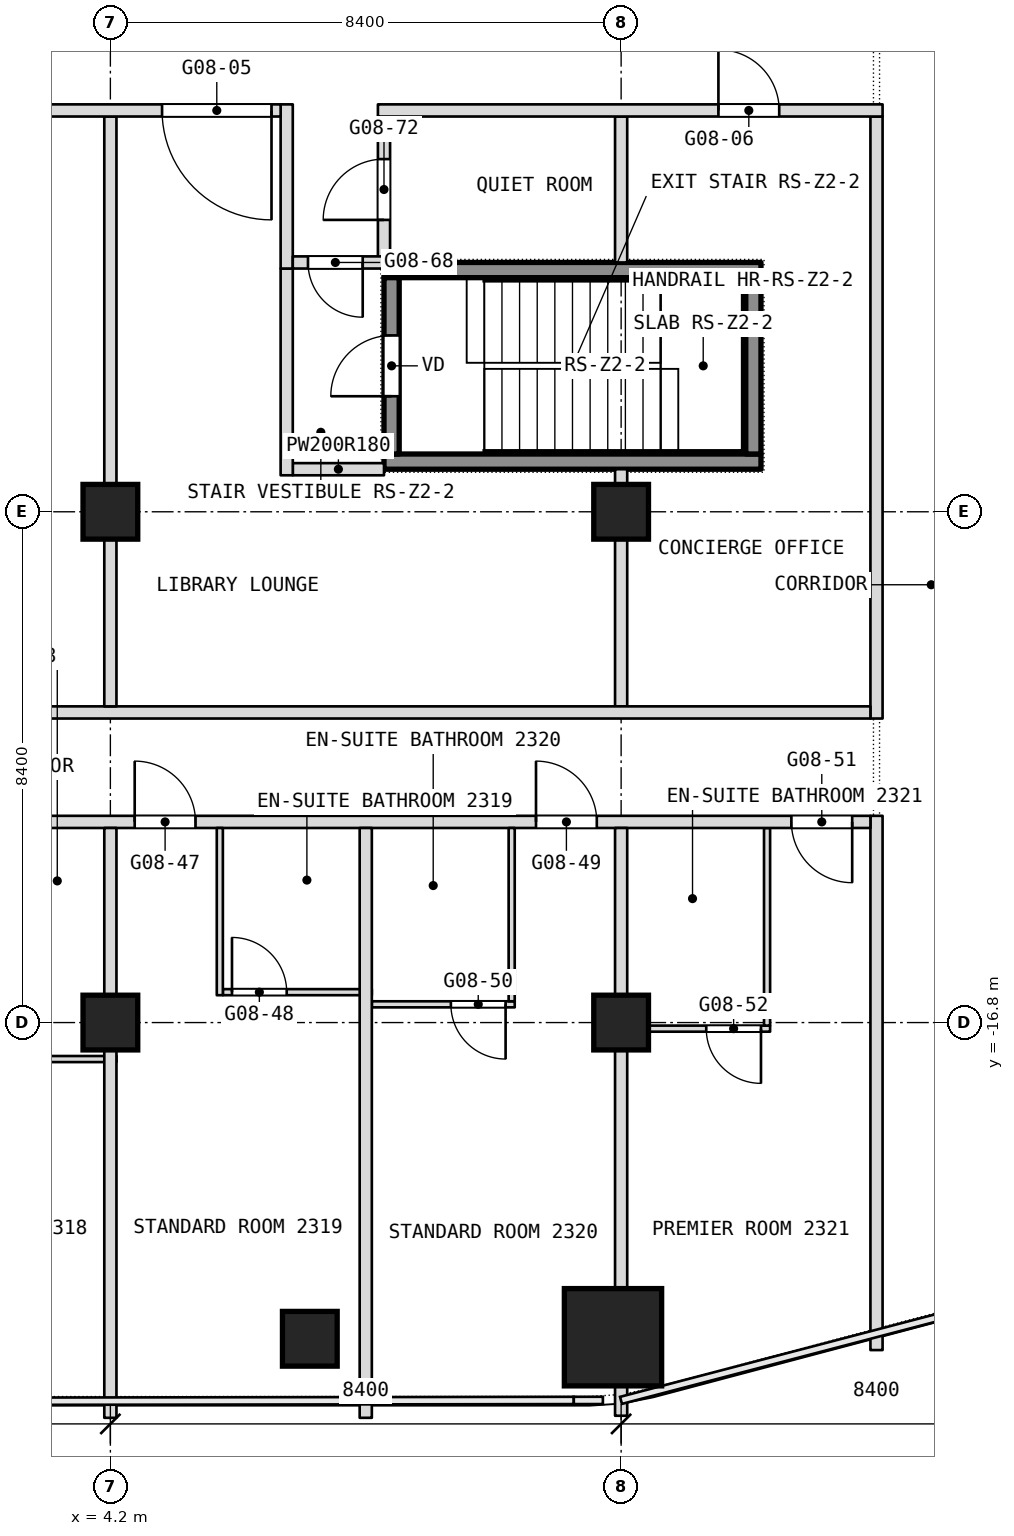
"""IFC4 building model, lengths in metres.
Left out: names, types, materials, properties, quantities, classifications, styles, units other than length and angle.
Written with IfcOpenShell. Run it as: python <this file> out.ifc"""

import sys

from ifc_helpers import new_model, si_unit, direction, frame, frame_2d, origin, origin_2d, place, context, subcontext, project, spatial, rectangle, extrude, element, fill, save


model = new_model("IFC4")
c1 = context("Model", 3, precision=1e-05, world=origin(), true_north=direction((0.0, 1.0)))
c2 = subcontext(c1, "Body", "Model", "MODEL_VIEW")
j1 = project(units=[si_unit("LENGTHUNIT", "METRE"), si_unit("PLANEANGLEUNIT", "RADIAN")], contexts=[c1])
p1 = place(None, origin())
s1 = spatial("IfcSite", under=j1, at=p1, CompositionType="ELEMENT")
p2 = place(p1, origin())
s2 = spatial("IfcBuilding", under=s1, at=p2, CompositionType="ELEMENT")
p3 = place(p2, frame((0.0, 0.0, 108.5)))
s3 = spatial("IfcBuildingStorey", under=s2, at=p3, CompositionType="ELEMENT", Elevation=108.5)
p4 = place(p3, frame((12.466, -21.975, 0.0), z_axis=(0.0, 0.0, 1.0), x_axis=(1.0, 0.0, 0.0)))
e1 = element("IfcColumn", 1, at=p4, inside=s3, PredefinedType="COLUMN", context=c2, shape_type="SweptSolid", body=[
    extrude(rectangle(XDim=1.6, YDim=1.6, at=origin_2d()), origin(), (0.0, 0.0, 1.0), 3.6),
])
for number, where, z_axis, x_axis in (
    (2, (4.2, -16.8, 0.0), (0.0, 0.0, 1.0), (1.0, 0.0, 0.0)),
    (3, (4.2, -8.4, 0.0), (0.0, 0.0, 1.0), (1.0, 0.0, 0.0)),
    (4, (12.6, -16.8, 0.0), (0.0, 0.0, 1.0), (1.0, 0.0, 0.0)),
    (5, (12.6, -8.4, 0.0), (0.0, 0.0, 1.0), (1.0, 0.0, 0.0)),
    (6, (7.48, -22.0, 0.0), (0.0, 0.0, 1.0), (1.0, 0.0, 0.0)),
):
    element("IfcColumn", number, at=place(p3, frame(where, z_axis=z_axis, x_axis=x_axis)), inside=s3, PredefinedType="COLUMN", context=c2, shape_type="SweptSolid", body=[
        extrude(rectangle(XDim=0.9, YDim=0.9, at=origin_2d()), origin(), (0.0, 0.0, 1.0), 3.6),
    ])
p5 = place(p3, frame((1.85, -17.4, 0.0), z_axis=(0.0, 0.0, 1.0), x_axis=(1.0, 0.0, 0.0)))
e7 = element("IfcWall", 7, at=p5, inside=s3, PredefinedType="PARTITIONING", context=c2, shape_type="SweptSolid", body=[
    extrude(rectangle(XDim=2.45, YDim=0.1, at=frame_2d((1.225, 0.0))), origin(), (0.0, 0.0, 1.0), 3.34),
])
p6 = place(p3, frame((12.7, -16.9, 0.0), z_axis=(0.0, 0.0, 1.0), x_axis=(1.0, 0.0, 0.0)))
e8 = element("IfcWall", 8, at=p6, inside=s3, PredefinedType="PARTITIONING", context=c2, shape_type="SweptSolid", body=[
    extrude(rectangle(XDim=2.35, YDim=0.1, at=frame_2d((1.175, 0.0))), origin(), (0.0, 0.0, 1.0), 2.89),
])
p7 = place(p6, frame((1.3, 0.0, 0.0)))
e9 = element("IfcOpeningElement", 9, at=p7, cuts=e8, PredefinedType="OPENING", context=c2, shape_type="SweptSolid", body=[
    extrude(rectangle(XDim=0.9, YDim=2.1, at=frame_2d((0.45, 1.05))), frame((0.0, 0.05, 0.0), z_axis=(0.0, -1.0, 0.0), x_axis=(1.0, 0.0, 0.0)), (0.0, 0.0, 1.0), 0.1),
])
p8 = place(p3, frame((16.8, -22.186, 0.0), z_axis=(0.0, 0.0, 1.0), x_axis=(0.0, 1.0, 0.0)))
e10 = element("IfcWall", 10, at=p8, inside=s3, PredefinedType="PARTITIONING", context=c2, shape_type="SweptSolid", body=[
    extrude(rectangle(XDim=8.786, YDim=0.2, at=frame_2d((4.393, 0.0))), origin(), (0.0, 0.0, 1.0), 3.34),
])
p9 = place(p3, frame((16.8, -11.8, 0.0), z_axis=(0.0, 0.0, 1.0), x_axis=(0.0, 1.0, 0.0)))
e11 = element("IfcWall", 11, at=p9, inside=s3, PredefinedType="PARTITIONING", context=c2, shape_type="SweptSolid", body=[
    extrude(rectangle(XDim=9.9, YDim=0.2, at=frame_2d((4.95, 0.0))), origin(), (0.0, 0.0, 1.0), 3.34),
])
p10 = place(p3, frame((8.5, -16.5, 0.0), z_axis=(0.0, 0.0, 1.0), x_axis=(1.0, 0.0, 0.0)))
e12 = element("IfcWall", 12, at=p10, inside=s3, PredefinedType="PARTITIONING", context=c2, shape_type="SweptSolid", body=[
    extrude(rectangle(XDim=2.35, YDim=0.1, at=frame_2d((1.175, 0.0))), origin(), (0.0, 0.0, 1.0), 3.34),
])
p11 = place(p10, frame((1.3, 0.0, 0.0)))
e13 = element("IfcOpeningElement", 13, at=p11, cuts=e12, PredefinedType="OPENING", context=c2, shape_type="SweptSolid", body=[
    extrude(rectangle(XDim=0.9, YDim=2.1, at=frame_2d((0.45, 1.05))), frame((0.0, 0.05, 0.0), z_axis=(0.0, -1.0, 0.0), x_axis=(1.0, 0.0, 0.0)), (0.0, 0.0, 1.0), 0.1),
])
p12 = place(p3, frame((6.05, -16.3, 0.0), z_axis=(0.0, 0.0, 1.0), x_axis=(1.0, 0.0, 0.0)))
e14 = element("IfcWall", 14, at=p12, inside=s3, PredefinedType="PARTITIONING", context=c2, shape_type="SweptSolid", body=[
    extrude(rectangle(XDim=2.45, YDim=0.1, at=frame_2d((1.225, 0.0))), origin(), (0.0, 0.0, 1.0), 3.34),
])
p13 = place(p12, frame((0.15, 0.0, 0.0)))
e15 = element("IfcOpeningElement", 15, at=p13, cuts=e14, PredefinedType="OPENING", context=c2, shape_type="SweptSolid", body=[
    extrude(rectangle(XDim=0.9, YDim=2.1, at=frame_2d((0.45, 1.05))), frame((0.0, 0.05, 0.0), z_axis=(0.0, -1.0, 0.0), x_axis=(1.0, 0.0, 0.0)), (0.0, 0.0, 1.0), 0.1),
])
p14 = place(p3, frame((15.0, -16.85, 0.0), z_axis=(0.0, 0.0, 1.0), x_axis=(0.0, 1.0, 0.0)))
e16 = element("IfcWall", 16, at=p14, inside=s3, PredefinedType="PARTITIONING", context=c2, shape_type="SweptSolid", body=[
    extrude(rectangle(XDim=3.25, YDim=0.1, at=frame_2d((1.625, 0.0))), origin(), (0.0, 0.0, 1.0), 3.34),
])
p15 = place(p3, frame((-3.2, -13.5, 0.0), z_axis=(0.0, 0.0, 1.0), x_axis=(1.0, 0.0, 0.0)))
e17 = element("IfcWall", 17, at=p15, inside=s3, PredefinedType="PARTITIONING", context=c2, shape_type="SweptSolid", body=[
    extrude(rectangle(XDim=19.9, YDim=0.2, at=frame_2d((9.95, 0.0))), origin(), (0.0, 0.0, 1.0), 3.34),
])
p16 = place(p15, frame((1.8, 0.0, 0.0)))
e18 = element("IfcOpeningElement", 18, at=p16, cuts=e17, PredefinedType="OPENING", context=c2, shape_type="SweptSolid", body=[
    extrude(rectangle(XDim=1.0, YDim=2.1, at=frame_2d((0.5, 1.05))), frame((0.0, 0.1, 0.0), z_axis=(0.0, -1.0, 0.0), x_axis=(1.0, 0.0, 0.0)), (0.0, 0.0, 1.0), 0.2),
])
p17 = place(p15, frame((3.6, 0.0, 0.0)))
e19 = element("IfcOpeningElement", 19, at=p17, cuts=e17, PredefinedType="OPENING", context=c2, shape_type="SweptSolid", body=[
    extrude(rectangle(XDim=1.0, YDim=2.1, at=frame_2d((0.5, 1.05))), frame((0.0, 0.1, 0.0), z_axis=(0.0, -1.0, 0.0), x_axis=(1.0, 0.0, 0.0)), (0.0, 0.0, 1.0), 0.2),
])
p18 = place(p15, frame((7.8, 0.0, 0.0)))
e20 = element("IfcOpeningElement", 20, at=p18, cuts=e17, PredefinedType="OPENING", context=c2, shape_type="SweptSolid", body=[
    extrude(rectangle(XDim=1.0, YDim=2.1, at=frame_2d((0.5, 1.05))), frame((0.0, 0.1, 0.0), z_axis=(0.0, -1.0, 0.0), x_axis=(1.0, 0.0, 0.0)), (0.0, 0.0, 1.0), 0.2),
])
p19 = place(p15, frame((14.4, 0.0, 0.0)))
e21 = element("IfcOpeningElement", 21, at=p19, cuts=e17, PredefinedType="OPENING", context=c2, shape_type="SweptSolid", body=[
    extrude(rectangle(XDim=1.0, YDim=2.1, at=frame_2d((0.5, 1.05))), frame((0.0, 0.1, 0.0), z_axis=(0.0, -1.0, 0.0), x_axis=(1.0, 0.0, 0.0)), (0.0, 0.0, 1.0), 0.2),
])
p20 = place(p15, frame((18.6, 0.0, 0.0)))
e22 = element("IfcOpeningElement", 22, at=p20, cuts=e17, PredefinedType="OPENING", context=c2, shape_type="SweptSolid", body=[
    extrude(rectangle(XDim=1.0, YDim=2.1, at=frame_2d((0.5, 1.05))), frame((0.0, 0.1, 0.0), z_axis=(0.0, -1.0, 0.0), x_axis=(1.0, 0.0, 0.0)), (0.0, 0.0, 1.0), 0.2),
])
p21 = place(p3, frame((12.6, -23.266, 0.0), z_axis=(0.0, 0.0, 1.0), x_axis=(0.0, 1.0, 0.0)))
e23 = element("IfcWall", 23, at=p21, inside=s3, PredefinedType="PARTITIONING", context=c2, shape_type="SweptSolid", body=[
    extrude(rectangle(XDim=0.491, YDim=0.2, at=frame_2d((0.246, 0.0))), origin(), (0.0, 0.0, 1.0), 3.34),
])
p22 = place(p3, frame((12.6, -21.175, 0.0), z_axis=(0.0, 0.0, 1.0), x_axis=(0.0, 1.0, 0.0)))
e24 = element("IfcWall", 24, at=p22, inside=s3, PredefinedType="PARTITIONING", context=c2, shape_type="SweptSolid", body=[
    extrude(rectangle(XDim=7.575, YDim=0.2, at=frame_2d((3.788, 0.0))), origin(), (0.0, 0.0, 1.0), 3.34),
])
p23 = place(p3, frame((12.6, -11.6, 0.0), z_axis=(0.0, 0.0, 1.0), x_axis=(0.0, 1.0, 0.0)))
e25 = element("IfcWall", 25, at=p23, inside=s3, PredefinedType="PARTITIONING", context=c2, shape_type="SweptSolid", body=[
    extrude(rectangle(XDim=3.9, YDim=0.2, at=frame_2d((1.95, 0.0))), origin(), (0.0, 0.0, 1.0), 3.34),
])
p24 = place(p3, frame((12.6, -4.3, 0.0), z_axis=(0.0, 0.0, 1.0), x_axis=(0.0, 1.0, 0.0)))
e26 = element("IfcWall", 26, at=p24, inside=s3, PredefinedType="PARTITIONING", context=c2, shape_type="SweptSolid", body=[
    extrude(rectangle(XDim=2.4, YDim=0.2, at=frame_2d((1.2, 0.0))), origin(), (0.0, 0.0, 1.0), 3.34),
])
p25 = place(p3, frame((-4.1, -11.7, 0.0), z_axis=(0.0, 0.0, 1.0), x_axis=(1.0, 0.0, 0.0)))
e27 = element("IfcWall", 27, at=p25, inside=s3, PredefinedType="PARTITIONING", context=c2, shape_type="SweptSolid", body=[
    extrude(rectangle(XDim=20.8, YDim=0.2, at=frame_2d((10.4, 0.0))), origin(), (0.0, 0.0, 1.0), 3.34),
])
p26 = place(p3, frame((10.8, -16.45, 0.0), z_axis=(0.0, 0.0, 1.0), x_axis=(0.0, 1.0, 0.0)))
e28 = element("IfcWall", 28, at=p26, inside=s3, PredefinedType="PARTITIONING", context=c2, shape_type="SweptSolid", body=[
    extrude(rectangle(XDim=2.85, YDim=0.1, at=frame_2d((1.425, 0.0))), origin(), (0.0, 0.0, 1.0), 3.34),
])
p27 = place(p3, frame((8.7, -4.3, 0.0), z_axis=(0.0, 0.0, 1.0), x_axis=(0.0, 1.0, 0.0)))
e29 = element("IfcWall", 29, at=p27, inside=s3, PredefinedType="PARTITIONING", context=c2, shape_type="SweptSolid", body=[
    extrude(rectangle(XDim=2.4, YDim=0.2, at=frame_2d((1.2, 0.0))), origin(), (0.0, 0.0, 1.0), 3.34),
])
p28 = place(p27, frame((0.7, 0.0, 0.0)))
e30 = element("IfcOpeningElement", 30, at=p28, cuts=e29, PredefinedType="OPENING", context=c2, shape_type="SweptSolid", body=[
    extrude(rectangle(XDim=1.0, YDim=2.1, at=frame_2d((0.5, 1.05))), frame((0.0, 0.1, 0.0), z_axis=(0.0, -1.0, 0.0), x_axis=(1.0, 0.0, 0.0)), (0.0, 0.0, 1.0), 0.2),
])
p29 = place(p3, frame((8.4, -23.3, 0.0), z_axis=(0.0, 0.0, 1.0), x_axis=(0.0, 1.0, 0.0)))
e31 = element("IfcWall", 31, at=p29, inside=s3, PredefinedType="PARTITIONING", context=c2, shape_type="SweptSolid", body=[
    extrude(rectangle(XDim=9.7, YDim=0.2, at=frame_2d((4.85, 0.0))), origin(), (0.0, 0.0, 1.0), 3.34),
])
p30 = place(p3, frame((7.2, -7.7, 0.0), z_axis=(0.0, 0.0, 1.0), x_axis=(1.0, 0.0, 0.0)))
e32 = element("IfcWall", 32, at=p30, inside=s3, PredefinedType="PARTITIONING", context=c2, shape_type="SweptSolid", body=[
    extrude(rectangle(XDim=1.5, YDim=0.2, at=frame_2d((0.75, 0.0))), origin(), (0.0, 0.0, 1.0), 3.34),
])
p31 = place(p3, frame((7.1, -7.8, 0.0), z_axis=(0.0, 0.0, 1.0), x_axis=(0.0, 1.0, 0.0)))
e33 = element("IfcWall", 33, at=p31, inside=s3, PredefinedType="PARTITIONING", context=c2, shape_type="SweptSolid", body=[
    extrude(rectangle(XDim=3.4, YDim=0.2, at=frame_2d((1.7, 0.0))), origin(), (0.0, 0.0, 1.0), 3.34),
])
p32 = place(p3, frame((7.1, -4.4, 0.0), z_axis=(0.0, 0.0, 1.0), x_axis=(0.0, 1.0, 0.0)))
e34 = element("IfcWall", 34, at=p32, inside=s3, PredefinedType="PARTITIONING", context=c2, shape_type="SweptSolid", body=[
    extrude(rectangle(XDim=2.7, YDim=0.2, at=frame_2d((1.35, 0.0))), origin(), (0.0, 0.0, 1.0), 3.34),
])
p33 = place(p3, frame((6.0, -16.35, 0.0), z_axis=(0.0, 0.0, 1.0), x_axis=(0.0, 1.0, 0.0)))
e35 = element("IfcWall", 35, at=p33, inside=s3, PredefinedType="PARTITIONING", context=c2, shape_type="SweptSolid", body=[
    extrude(rectangle(XDim=2.75, YDim=0.1, at=frame_2d((1.375, 0.0))), origin(), (0.0, 0.0, 1.0), 3.34),
])
p34 = place(p3, frame((7.2, -4.3, 0.0), z_axis=(0.0, 0.0, 1.0), x_axis=(1.0, 0.0, 0.0)))
e36 = element("IfcWall", 36, at=p34, inside=s3, PredefinedType="PARTITIONING", context=c2, shape_type="SweptSolid", body=[
    extrude(rectangle(XDim=1.5, YDim=0.2, at=frame_2d((0.75, 0.0))), origin(), (0.0, 0.0, 1.0), 3.34),
])
p35 = place(p34, frame((0.25, 0.0, 0.0)))
e37 = element("IfcOpeningElement", 37, at=p35, cuts=e36, PredefinedType="OPENING", context=c2, shape_type="SweptSolid", body=[
    extrude(rectangle(XDim=0.9, YDim=2.1, at=frame_2d((0.45, 1.05))), frame((0.0, 0.1, 0.0), z_axis=(0.0, -1.0, 0.0), x_axis=(1.0, 0.0, 0.0)), (0.0, 0.0, 1.0), 0.2),
])
p36 = place(p3, frame((4.2, -23.3, 0.0), z_axis=(0.0, 0.0, 1.0), x_axis=(0.0, 1.0, 0.0)))
e38 = element("IfcWall", 38, at=p36, inside=s3, PredefinedType="PARTITIONING", context=c2, shape_type="SweptSolid", body=[
    extrude(rectangle(XDim=9.7, YDim=0.2, at=frame_2d((4.85, 0.0))), origin(), (0.0, 0.0, 1.0), 3.34),
])
p37 = place(p3, frame((4.2, -11.6, 0.0), z_axis=(0.0, 0.0, 1.0), x_axis=(0.0, 1.0, 0.0)))
e39 = element("IfcWall", 39, at=p37, inside=s3, PredefinedType="PARTITIONING", context=c2, shape_type="SweptSolid", body=[
    extrude(rectangle(XDim=9.7, YDim=0.2, at=frame_2d((4.85, 0.0))), origin(), (0.0, 0.0, 1.0), 3.34),
])
p38 = place(p3, frame((-4.3, -1.8, 0.0), z_axis=(0.0, 0.0, 1.0), x_axis=(1.0, 0.0, 0.0)))
e40 = element("IfcWall", 40, at=p38, inside=s3, PredefinedType="PARTITIONING", context=c2, shape_type="SweptSolid", body=[
    extrude(rectangle(XDim=11.3, YDim=0.2, at=frame_2d((5.65, 0.0))), origin(), (0.0, 0.0, 1.0), 3.34),
])
p39 = place(p38, frame((3.4, 0.0, 0.0)))
e41 = element("IfcOpeningElement", 41, at=p39, cuts=e40, PredefinedType="OPENING", context=c2, shape_type="SweptSolid", body=[
    extrude(rectangle(XDim=1.8, YDim=2.1, at=frame_2d((0.9, 1.05))), frame((0.0, 0.1, 0.0), z_axis=(0.0, -1.0, 0.0), x_axis=(1.0, 0.0, 0.0)), (0.0, 0.0, 1.0), 0.2),
])
p40 = place(p38, frame((9.35, 0.0, 0.0)))
e42 = element("IfcOpeningElement", 42, at=p40, cuts=e40, PredefinedType="OPENING", context=c2, shape_type="SweptSolid", body=[
    extrude(rectangle(XDim=1.8, YDim=2.1, at=frame_2d((0.9, 1.05))), frame((0.0, 0.1, 0.0), z_axis=(0.0, -1.0, 0.0), x_axis=(1.0, 0.0, 0.0)), (0.0, 0.0, 1.0), 0.2),
])
p41 = place(p3, frame((8.6, -1.8, 0.0), z_axis=(0.0, 0.0, 1.0), x_axis=(1.0, 0.0, 0.0)))
e43 = element("IfcWall", 43, at=p41, inside=s3, PredefinedType="PARTITIONING", context=c2, shape_type="SweptSolid", body=[
    extrude(rectangle(XDim=8.3, YDim=0.2, at=frame_2d((4.15, 0.0))), origin(), (0.0, 0.0, 1.0), 3.34),
])
p42 = place(p41, frame((5.6, 0.0, 0.0)))
e44 = element("IfcOpeningElement", 44, at=p42, cuts=e43, PredefinedType="OPENING", context=c2, shape_type="SweptSolid", body=[
    extrude(rectangle(XDim=1.0, YDim=2.1, at=frame_2d((0.5, 1.05))), frame((0.0, 0.1, 0.0), z_axis=(0.0, -1.0, 0.0), x_axis=(1.0, 0.0, 0.0)), (0.0, 0.0, 1.0), 0.2),
])
for number, where, z_axis, x_axis in (
    (45, (8.7, -7.575, 0.1), (0.0, 0.0, 1.0), (1.0, 0.0, 0.0)),
    (46, (8.7, -4.425, 0.1), (0.0, 0.0, 1.0), (1.0, 0.0, 0.0)),
):
    element("IfcWall", number, at=place(p3, frame(where, z_axis=z_axis, x_axis=x_axis)), inside=s3, PredefinedType="SHEAR", context=c2, shape_type="SweptSolid", body=[
        extrude(rectangle(XDim=6.2, YDim=0.25, at=frame_2d((3.1, 0.0))), origin(), (0.0, 0.0, 1.0), 3.6),
    ])
p43 = place(p3, frame((8.825, -7.45, 0.1), z_axis=(0.0, 0.0, 1.0), x_axis=(0.0, 1.0, 0.0)))
e47 = element("IfcWall", 47, at=p43, inside=s3, PredefinedType="SHEAR", context=c2, shape_type="SweptSolid", body=[
    extrude(rectangle(XDim=2.9, YDim=0.25, at=frame_2d((1.45, 0.0))), origin(), (0.0, 0.0, 1.0), 3.6),
])
p44 = place(p43, frame((0.95, 0.0, 0.0)))
e48 = element("IfcOpeningElement", 48, at=p44, cuts=e47, PredefinedType="OPENING", context=c2, shape_type="SweptSolid", body=[
    extrude(rectangle(XDim=1.0, YDim=2.1, at=frame_2d((0.5, 1.05))), frame((0.0, 0.125, 0.0), z_axis=(0.0, -1.0, 0.0), x_axis=(1.0, 0.0, 0.0)), (0.0, 0.0, 1.0), 0.25),
])
p45 = place(p3, frame((14.775, -7.45, 0.1), z_axis=(0.0, 0.0, 1.0), x_axis=(0.0, 1.0, 0.0)))
e49 = element("IfcWall", 49, at=p45, inside=s3, PredefinedType="SHEAR", context=c2, shape_type="SweptSolid", body=[
    extrude(rectangle(XDim=2.9, YDim=0.25, at=frame_2d((1.45, 0.0))), origin(), (0.0, 0.0, 1.0), 3.6),
])
p46 = place(p7, origin())
e50 = element("IfcDoor", 50, at=p46, inside=s3, OperationType="SINGLE_SWING_RIGHT", PredefinedType="DOOR", context=c2, shape_type="SweptSolid", body=[
    extrude(rectangle(XDim=0.9, YDim=2.1, at=frame_2d((0.45, 1.05))), frame((0.0, 0.025, 0.0), z_axis=(0.0, -1.0, 0.0), x_axis=(1.0, 0.0, 0.0)), (0.0, 0.0, 1.0), 0.05),
])
fill(e9, e50)
p47 = place(p11, origin())
e51 = element("IfcDoor", 51, at=p47, inside=s3, OperationType="SINGLE_SWING_RIGHT", PredefinedType="DOOR", context=c2, shape_type="SweptSolid", body=[
    extrude(rectangle(XDim=0.9, YDim=2.1, at=frame_2d((0.45, 1.05))), frame((0.0, 0.025, 0.0), z_axis=(0.0, -1.0, 0.0), x_axis=(1.0, 0.0, 0.0)), (0.0, 0.0, 1.0), 0.05),
])
fill(e13, e51)
p48 = place(p13, origin())
e52 = element("IfcDoor", 52, at=p48, inside=s3, OperationType="SINGLE_SWING_LEFT", PredefinedType="DOOR", context=c2, shape_type="SweptSolid", body=[
    extrude(rectangle(XDim=0.9, YDim=2.1, at=frame_2d((0.45, 1.05))), frame((0.0, 0.025, 0.0), z_axis=(0.0, -1.0, 0.0), x_axis=(1.0, 0.0, 0.0)), (0.0, 0.0, 1.0), 0.05),
])
fill(e15, e52)
p49 = place(p18, origin())
e53 = element("IfcDoor", 53, at=p49, inside=s3, OperationType="SINGLE_SWING_LEFT", PredefinedType="DOOR", context=c2, shape_type="SweptSolid", body=[
    extrude(rectangle(XDim=1.0, YDim=2.1, at=frame_2d((0.5, 1.05))), frame((0.0, 0.025, 0.0), z_axis=(0.0, -1.0, 0.0), x_axis=(1.0, 0.0, 0.0)), (0.0, 0.0, 1.0), 0.05),
])
fill(e20, e53)
p50 = place(p19, origin())
e54 = element("IfcDoor", 54, at=p50, inside=s3, OperationType="SINGLE_SWING_LEFT", PredefinedType="DOOR", context=c2, shape_type="SweptSolid", body=[
    extrude(rectangle(XDim=1.0, YDim=2.1, at=frame_2d((0.5, 1.05))), frame((0.0, 0.025, 0.0), z_axis=(0.0, -1.0, 0.0), x_axis=(1.0, 0.0, 0.0)), (0.0, 0.0, 1.0), 0.05),
])
fill(e21, e54)
p51 = place(p20, origin())
e55 = element("IfcDoor", 55, at=p51, inside=s3, OperationType="SINGLE_SWING_LEFT", PredefinedType="DOOR", context=c2, shape_type="SweptSolid", body=[
    extrude(rectangle(XDim=1.0, YDim=2.1, at=frame_2d((0.5, 1.05))), frame((0.0, 0.025, 0.0), z_axis=(0.0, -1.0, 0.0), x_axis=(1.0, 0.0, 0.0)), (0.0, 0.0, 1.0), 0.05),
])
fill(e22, e55)
p52 = place(p28, origin())
e56 = element("IfcDoor", 56, at=p52, inside=s3, OperationType="SINGLE_SWING_LEFT", PredefinedType="DOOR", context=c2, shape_type="SweptSolid", body=[
    extrude(rectangle(XDim=1.0, YDim=2.1, at=frame_2d((0.5, 1.05))), frame((0.0, 0.025, 0.0), z_axis=(0.0, -1.0, 0.0), x_axis=(1.0, 0.0, 0.0)), (0.0, 0.0, 1.0), 0.05),
])
fill(e30, e56)
p53 = place(p35, origin())
e57 = element("IfcDoor", 57, at=p53, inside=s3, OperationType="SINGLE_SWING_RIGHT", PredefinedType="DOOR", context=c2, shape_type="SweptSolid", body=[
    extrude(rectangle(XDim=0.9, YDim=2.1, at=frame_2d((0.45, 1.05))), frame((0.0, 0.025, 0.0), z_axis=(0.0, -1.0, 0.0), x_axis=(1.0, 0.0, 0.0)), (0.0, 0.0, 1.0), 0.05),
])
fill(e37, e57)
p54 = place(p40, origin())
e58 = element("IfcDoor", 58, at=p54, inside=s3, OperationType="DOUBLE_DOOR_SINGLE_SWING", PredefinedType="DOOR", context=c2, shape_type="SweptSolid", body=[
    extrude(rectangle(XDim=1.8, YDim=2.1, at=frame_2d((0.9, 1.05))), frame((0.0, 0.025, 0.0), z_axis=(0.0, -1.0, 0.0), x_axis=(1.0, 0.0, 0.0)), (0.0, 0.0, 1.0), 0.05),
])
fill(e42, e58)
p55 = place(p42, origin())
e59 = element("IfcDoor", 59, at=p55, inside=s3, OperationType="SINGLE_SWING_RIGHT", PredefinedType="DOOR", context=c2, shape_type="SweptSolid", body=[
    extrude(rectangle(XDim=1.0, YDim=2.1, at=frame_2d((0.5, 1.05))), frame((0.0, 0.025, 0.0), z_axis=(0.0, -1.0, 0.0), x_axis=(1.0, 0.0, 0.0)), (0.0, 0.0, 1.0), 0.05),
])
fill(e44, e59)
p56 = place(p44, origin())
e60 = element("IfcDoor", 60, at=p56, inside=s3, OperationType="SINGLE_SWING_LEFT", PredefinedType="DOOR", context=c2, shape_type="SweptSolid", body=[
    extrude(rectangle(XDim=1.0, YDim=2.1, at=frame_2d((0.5, 1.05))), frame((0.0, 0.025, 0.0), z_axis=(0.0, -1.0, 0.0), x_axis=(1.0, 0.0, 0.0)), (0.0, 0.0, 1.0), 0.05),
])
fill(e48, e60)
save(model, sys.argv[1])
